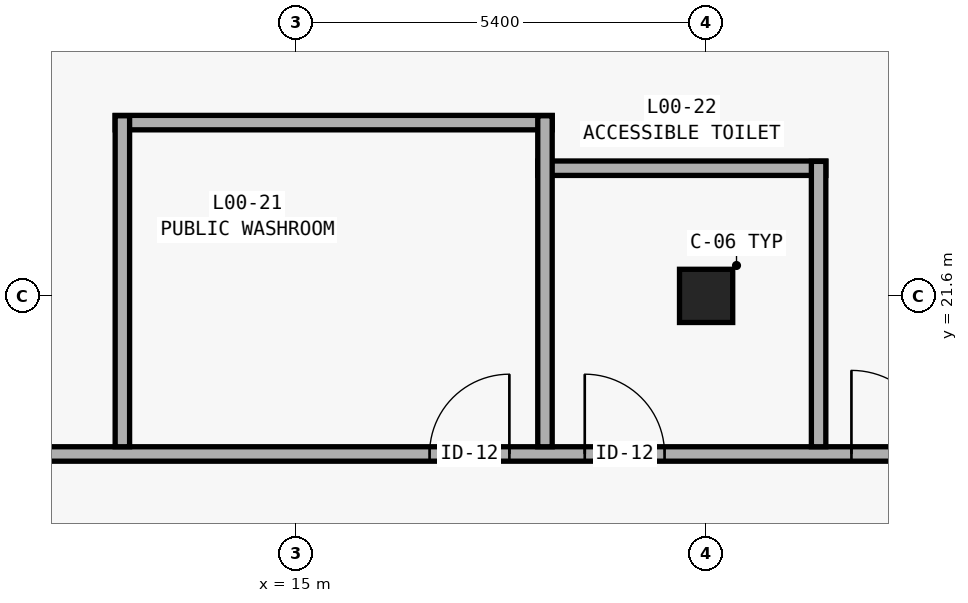
"""IFC4 building model, lengths in metres.
Left out: names, types, materials, properties, quantities, classifications, styles, units other than length and angle.
Written with IfcOpenShell. Run it as: python <this file> out.ifc"""

import sys

from ifc_helpers import new_model, si_unit, direction, frame, frame_2d, origin, origin_2d, place, context, subcontext, project, spatial, rectangle, extrude, element, fill, save


model = new_model("IFC4")
c1 = context("Model", 3, precision=1e-05, world=origin(), true_north=direction((0.0, 1.0)))
c2 = subcontext(c1, "Body", "Model", "MODEL_VIEW")
j1 = project(units=[si_unit("LENGTHUNIT", "METRE"), si_unit("PLANEANGLEUNIT", "RADIAN")], contexts=[c1])
p1 = place(None, origin())
s1 = spatial("IfcSite", under=j1, at=p1, CompositionType="ELEMENT")
p2 = place(p1, origin())
s2 = spatial("IfcBuilding", under=s1, at=p2, CompositionType="ELEMENT")
p3 = place(p2, origin())
s3 = spatial("IfcBuildingStorey", under=s2, at=p3, CompositionType="ELEMENT", Elevation=0.0)
p4 = place(p3, frame((20.4, 21.6, 0.0), z_axis=(0.0, 0.0, 1.0), x_axis=(1.0, 0.0, 0.0)))
e1 = element("IfcColumn", 1, at=p4, inside=s3, PredefinedType="COLUMN", context=c2, shape_type="SweptSolid", body=[
    extrude(rectangle(XDim=0.7, YDim=0.7, at=origin_2d()), origin(), (0.0, 0.0, 1.0), 4.8),
])
p5 = place(p3, frame((9.8, 19.52, 0.0), z_axis=(0.0, 0.0, 1.0), x_axis=(1.0, 0.0, 0.0)))
e2 = element("IfcWall", 2, at=p5, inside=s3, PredefinedType="PARTITIONING", context=c2, shape_type="SweptSolid", body=[
    extrude(rectangle(XDim=17.015, YDim=0.19, at=frame_2d((8.507, 0.0))), origin(), (0.0, 0.0, 1.0), 3.38),
])
p6 = place(p5, frame((6.962, 0.0, 0.0)))
e3 = element("IfcOpeningElement", 3, at=p6, cuts=e2, PredefinedType="OPENING", context=c2, shape_type="SweptSolid", body=[
    extrude(rectangle(XDim=1.05, YDim=2.1, at=frame_2d((0.525, 1.05))), frame((0.0, 0.11, 0.0), z_axis=(0.0, -1.0, 0.0), x_axis=(1.0, 0.0, 0.0)), (0.0, 0.0, 1.0), 0.22),
])
p7 = place(p5, frame((9.003, 0.0, 0.0)))
e4 = element("IfcOpeningElement", 4, at=p7, cuts=e2, PredefinedType="OPENING", context=c2, shape_type="SweptSolid", body=[
    extrude(rectangle(XDim=1.05, YDim=2.1, at=frame_2d((0.525, 1.05))), frame((0.0, 0.11, 0.0), z_axis=(0.0, -1.0, 0.0), x_axis=(1.0, 0.0, 0.0)), (0.0, 0.0, 1.0), 0.22),
])
p8 = place(p5, frame((12.512, 0.0, 0.0)))
e5 = element("IfcOpeningElement", 5, at=p8, cuts=e2, PredefinedType="OPENING", context=c2, shape_type="SweptSolid", body=[
    extrude(rectangle(XDim=2.2, YDim=2.45, at=frame_2d((1.1, 1.225))), frame((0.0, 0.11, 0.0), z_axis=(0.0, -1.0, 0.0), x_axis=(1.0, 0.0, 0.0)), (0.0, 0.0, 1.0), 0.22),
])
p9 = place(p3, frame((18.185, 23.28, 0.0), z_axis=(0.0, 0.0, 1.0), x_axis=(1.0, 0.0, 0.0)))
e6 = element("IfcWall", 6, at=p9, inside=s3, PredefinedType="PARTITIONING", context=c2, shape_type="SweptSolid", body=[
    extrude(rectangle(XDim=3.79, YDim=0.19, at=frame_2d((1.895, 0.0))), origin(), (0.0, 0.0, 1.0), 3.38),
])
p10 = place(p3, frame((12.625, 23.88, 0.0), z_axis=(0.0, 0.0, 1.0), x_axis=(1.0, 0.0, 0.0)))
e7 = element("IfcWall", 7, at=p10, inside=s3, PredefinedType="PARTITIONING", context=c2, shape_type="SweptSolid", body=[
    extrude(rectangle(XDim=5.75, YDim=0.19, at=frame_2d((2.875, 0.0))), origin(), (0.0, 0.0, 1.0), 3.38),
])
for number, where, z_axis, x_axis in (
    (8, (12.72, 19.615, 0.0), (0.0, 0.0, 1.0), (0.0, 1.0, 0.0)),
    (9, (18.28, 19.615, 0.0), (0.0, 0.0, 1.0), (0.0, 1.0, 0.0)),
):
    element("IfcWall", number, at=place(p3, frame(where, z_axis=z_axis, x_axis=x_axis)), inside=s3, PredefinedType="PARTITIONING", context=c2, shape_type="SweptSolid", body=[
        extrude(rectangle(XDim=4.355, YDim=0.19, at=frame_2d((2.177, 0.0))), origin(), (0.0, 0.0, 1.0), 3.38),
    ])
p11 = place(p3, frame((21.88, 19.615, 0.0), z_axis=(0.0, 0.0, 1.0), x_axis=(0.0, 1.0, 0.0)))
e10 = element("IfcWall", 10, at=p11, inside=s3, PredefinedType="PARTITIONING", context=c2, shape_type="SweptSolid", body=[
    extrude(rectangle(XDim=3.755, YDim=0.19, at=frame_2d((1.877, 0.0))), origin(), (0.0, 0.0, 1.0), 3.38),
])
p12 = place(p6, origin())
e11 = element("IfcDoor", 11, at=p12, inside=s3, OperationType="SINGLE_SWING_RIGHT", PredefinedType="DOOR", context=c2, shape_type="SweptSolid", body=[
    extrude(rectangle(XDim=1.05, YDim=2.1, at=frame_2d((0.525, 1.05))), frame((0.0, 0.025, 0.0), z_axis=(0.0, -1.0, 0.0), x_axis=(1.0, 0.0, 0.0)), (0.0, 0.0, 1.0), 0.05),
])
fill(e3, e11)
p13 = place(p7, origin())
e12 = element("IfcDoor", 12, at=p13, inside=s3, OperationType="SINGLE_SWING_LEFT", PredefinedType="DOOR", context=c2, shape_type="SweptSolid", body=[
    extrude(rectangle(XDim=1.05, YDim=2.1, at=frame_2d((0.525, 1.05))), frame((0.0, 0.025, 0.0), z_axis=(0.0, -1.0, 0.0), x_axis=(1.0, 0.0, 0.0)), (0.0, 0.0, 1.0), 0.05),
])
fill(e4, e12)
p14 = place(p8, origin())
e13 = element("IfcDoor", 13, at=p14, inside=s3, OperationType="DOUBLE_DOOR_SINGLE_SWING", PredefinedType="DOOR", context=c2, shape_type="SweptSolid", body=[
    extrude(rectangle(XDim=2.2, YDim=2.45, at=frame_2d((1.1, 1.225))), frame((0.0, 0.025, 0.0), z_axis=(0.0, -1.0, 0.0), x_axis=(1.0, 0.0, 0.0)), (0.0, 0.0, 1.0), 0.05),
])
fill(e5, e13)
save(model, sys.argv[1])
